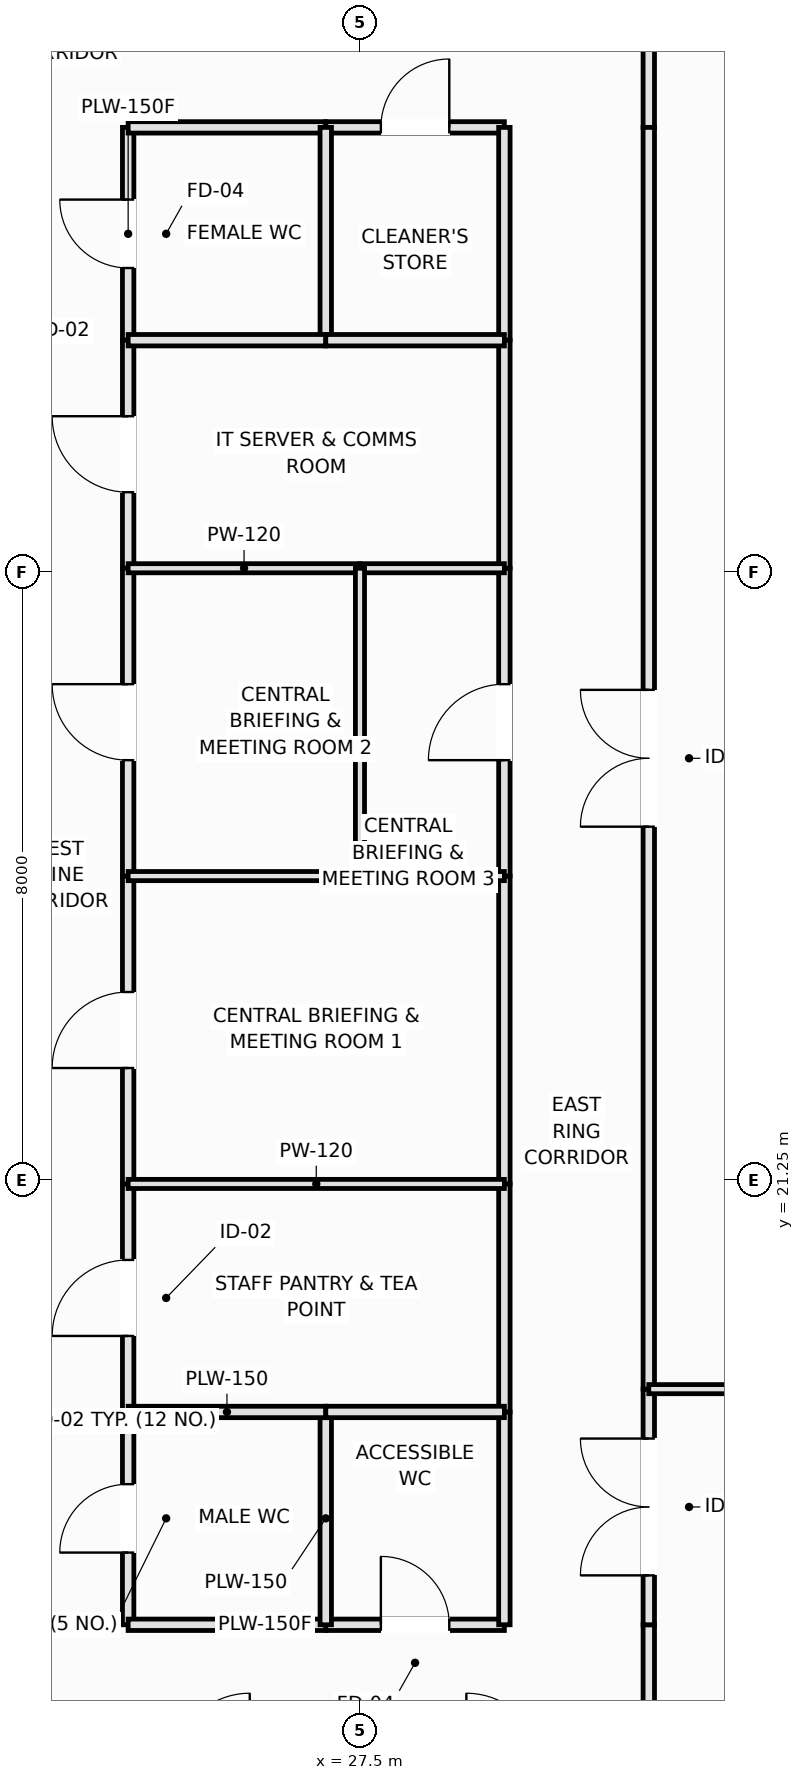
"""IFC4 building model, lengths in metres.
Left out: names, types, materials, properties, quantities, classifications, styles, units other than length and angle.
Written with IfcOpenShell. Run it as: python <this file> out.ifc"""

import sys

from ifc_helpers import new_model, si_unit, direction, frame, frame_2d, origin, place, context, subcontext, project, spatial, rectangle, extrude, element, fill, save


model = new_model("IFC4")
c1 = context("Model", 3, precision=1e-05, world=origin(), true_north=direction((0.0, 1.0)))
c2 = subcontext(c1, "Body", "Model", "MODEL_VIEW")
j1 = project(units=[si_unit("LENGTHUNIT", "METRE"), si_unit("PLANEANGLEUNIT", "RADIAN")], contexts=[c1])
p1 = place(None, origin())
s1 = spatial("IfcSite", under=j1, at=p1, CompositionType="ELEMENT")
p2 = place(p1, origin())
s2 = spatial("IfcBuilding", under=s1, at=p2, CompositionType="ELEMENT")
p3 = place(p2, frame((0.0, 0.0, 85.95)))
s3 = spatial("IfcBuildingStorey", under=s2, at=p3, CompositionType="ELEMENT", Elevation=85.95)
p4 = place(p3, frame((24.45, 15.4, 0.0), z_axis=(0.0, 0.0, 1.0), x_axis=(0.0, 1.0, 0.0)))
e1 = element("IfcWall", 1, at=p4, inside=s3, PredefinedType="PLUMBINGWALL", context=c2, shape_type="SweptSolid", body=[
    extrude(rectangle(XDim=2.8, YDim=0.15, at=frame_2d((1.4, 0.0))), origin(), (0.0, 0.0, 1.0), 3.37),
])
p5 = place(p4, frame((0.95, 0.0, 0.0)))
e2 = element("IfcOpeningElement", 2, at=p5, cuts=e1, PredefinedType="OPENING", context=c2, shape_type="SweptSolid", body=[
    extrude(rectangle(XDim=0.9, YDim=2.1, at=frame_2d((0.45, 1.05))), frame((0.0, 0.085, 0.0), z_axis=(0.0, -1.0, 0.0), x_axis=(1.0, 0.0, 0.0)), (0.0, 0.0, 1.0), 0.17),
])
p6 = place(p3, frame((24.45, 32.3, 0.0), z_axis=(0.0, 0.0, 1.0), x_axis=(0.0, 1.0, 0.0)))
e3 = element("IfcWall", 3, at=p6, inside=s3, PredefinedType="PLUMBINGWALL", context=c2, shape_type="SweptSolid", body=[
    extrude(rectangle(XDim=2.8, YDim=0.15, at=frame_2d((1.4, 0.0))), origin(), (0.0, 0.0, 1.0), 3.37),
])
p7 = place(p6, frame((0.95, 0.0, 0.0)))
e4 = element("IfcOpeningElement", 4, at=p7, cuts=e3, PredefinedType="OPENING", context=c2, shape_type="SweptSolid", body=[
    extrude(rectangle(XDim=0.9, YDim=2.1, at=frame_2d((0.45, 1.05))), frame((0.0, 0.085, 0.0), z_axis=(0.0, -1.0, 0.0), x_axis=(1.0, 0.0, 0.0)), (0.0, 0.0, 1.0), 0.17),
])
p8 = place(p3, frame((24.45, 18.2, 0.0), z_axis=(0.0, 0.0, 1.0), x_axis=(0.0, 1.0, 0.0)))
e5 = element("IfcWall", 5, at=p8, inside=s3, PredefinedType="PARTITIONING", context=c2, shape_type="SweptSolid", body=[
    extrude(rectangle(XDim=3.0, YDim=0.15, at=frame_2d((1.5, 0.0))), origin(), (0.0, 0.0, 1.0), 3.37),
])
p9 = place(p8, frame((1.0, 0.0, 0.0)))
e6 = element("IfcOpeningElement", 6, at=p9, cuts=e5, PredefinedType="OPENING", context=c2, shape_type="SweptSolid", body=[
    extrude(rectangle(XDim=1.0, YDim=2.15, at=frame_2d((0.5, 1.075))), frame((0.0, 0.085, 0.0), z_axis=(0.0, -1.0, 0.0), x_axis=(1.0, 0.0, 0.0)), (0.0, 0.0, 1.0), 0.17),
])
p10 = place(p3, frame((24.45, 29.3, 0.0), z_axis=(0.0, 0.0, 1.0), x_axis=(0.0, 1.0, 0.0)))
e7 = element("IfcWall", 7, at=p10, inside=s3, PredefinedType="PARTITIONING", context=c2, shape_type="SweptSolid", body=[
    extrude(rectangle(XDim=3.0, YDim=0.15, at=frame_2d((1.5, 0.0))), origin(), (0.0, 0.0, 1.0), 3.37),
])
p11 = place(p10, frame((1.0, 0.0, 0.0)))
e8 = element("IfcOpeningElement", 8, at=p11, cuts=e7, PredefinedType="OPENING", context=c2, shape_type="SweptSolid", body=[
    extrude(rectangle(XDim=1.0, YDim=2.15, at=frame_2d((0.5, 1.075))), frame((0.0, 0.085, 0.0), z_axis=(0.0, -1.0, 0.0), x_axis=(1.0, 0.0, 0.0)), (0.0, 0.0, 1.0), 0.17),
])
p12 = place(p3, frame((24.45, 21.2, 0.0), z_axis=(0.0, 0.0, 1.0), x_axis=(0.0, 1.0, 0.0)))
e9 = element("IfcWall", 9, at=p12, inside=s3, PredefinedType="PARTITIONING", context=c2, shape_type="SweptSolid", body=[
    extrude(rectangle(XDim=4.05, YDim=0.15, at=frame_2d((2.025, 0.0))), origin(), (0.0, 0.0, 1.0), 3.37),
])
p13 = place(p12, frame((1.525, 0.0, 0.0)))
e10 = element("IfcOpeningElement", 10, at=p13, cuts=e9, PredefinedType="OPENING", context=c2, shape_type="SweptSolid", body=[
    extrude(rectangle(XDim=1.0, YDim=2.15, at=frame_2d((0.5, 1.075))), frame((0.0, 0.085, 0.0), z_axis=(0.0, -1.0, 0.0), x_axis=(1.0, 0.0, 0.0)), (0.0, 0.0, 1.0), 0.17),
])
p14 = place(p3, frame((24.45, 25.25, 0.0), z_axis=(0.0, 0.0, 1.0), x_axis=(0.0, 1.0, 0.0)))
e11 = element("IfcWall", 11, at=p14, inside=s3, PredefinedType="PARTITIONING", context=c2, shape_type="SweptSolid", body=[
    extrude(rectangle(XDim=4.05, YDim=0.15, at=frame_2d((2.025, 0.0))), origin(), (0.0, 0.0, 1.0), 3.37),
])
p15 = place(p14, frame((1.525, 0.0, 0.0)))
e12 = element("IfcOpeningElement", 12, at=p15, cuts=e11, PredefinedType="OPENING", context=c2, shape_type="SweptSolid", body=[
    extrude(rectangle(XDim=1.0, YDim=2.15, at=frame_2d((0.5, 1.075))), frame((0.0, 0.085, 0.0), z_axis=(0.0, -1.0, 0.0), x_axis=(1.0, 0.0, 0.0)), (0.0, 0.0, 1.0), 0.17),
])
p16 = place(p3, frame((24.45, 15.4, 0.0), z_axis=(0.0, 0.0, 1.0), x_axis=(1.0, 0.0, 0.0)))
e13 = element("IfcWall", 13, at=p16, inside=s3, PredefinedType="PLUMBINGWALL", context=c2, shape_type="SweptSolid", body=[
    extrude(rectangle(XDim=2.6, YDim=0.15, at=frame_2d((1.3, 0.0))), origin(), (0.0, 0.0, 1.0), 3.37),
])
p17 = place(p3, frame((27.05, 15.4, 0.0), z_axis=(0.0, 0.0, 1.0), x_axis=(1.0, 0.0, 0.0)))
e14 = element("IfcWall", 14, at=p17, inside=s3, PredefinedType="PLUMBINGWALL", context=c2, shape_type="SweptSolid", body=[
    extrude(rectangle(XDim=2.35, YDim=0.15, at=frame_2d((1.175, 0.0))), origin(), (0.0, 0.0, 1.0), 3.37),
])
p18 = place(p17, frame((0.725, 0.0, 0.0)))
e15 = element("IfcOpeningElement", 15, at=p18, cuts=e14, PredefinedType="OPENING", context=c2, shape_type="SweptSolid", body=[
    extrude(rectangle(XDim=0.9, YDim=2.1, at=frame_2d((0.45, 1.05))), frame((0.0, 0.085, 0.0), z_axis=(0.0, -1.0, 0.0), x_axis=(1.0, 0.0, 0.0)), (0.0, 0.0, 1.0), 0.17),
])
p19 = place(p3, frame((31.3, 13.5, 0.0), z_axis=(0.0, 0.0, 1.0), x_axis=(0.0, 1.0, 0.0)))
e16 = element("IfcWall", 16, at=p19, inside=s3, PredefinedType="PARTITIONING", context=c2, shape_type="SweptSolid", body=[
    extrude(rectangle(XDim=1.9, YDim=0.15, at=frame_2d((0.95, 0.0))), origin(), (0.0, 0.0, 1.0), 3.37),
])
p20 = place(p3, frame((24.45, 35.1, 0.0), z_axis=(0.0, 0.0, 1.0), x_axis=(1.0, 0.0, 0.0)))
e17 = element("IfcWall", 17, at=p20, inside=s3, PredefinedType="PLUMBINGWALL", context=c2, shape_type="SweptSolid", body=[
    extrude(rectangle(XDim=2.6, YDim=0.15, at=frame_2d((1.3, 0.0))), origin(), (0.0, 0.0, 1.0), 3.37),
])
p21 = place(p3, frame((27.05, 35.1, 0.0), z_axis=(0.0, 0.0, 1.0), x_axis=(1.0, 0.0, 0.0)))
e18 = element("IfcWall", 18, at=p21, inside=s3, PredefinedType="PLUMBINGWALL", context=c2, shape_type="SweptSolid", body=[
    extrude(rectangle(XDim=2.35, YDim=0.15, at=frame_2d((1.175, 0.0))), origin(), (0.0, 0.0, 1.0), 3.37),
])
p22 = place(p21, frame((0.725, 0.0, 0.0)))
e19 = element("IfcOpeningElement", 19, at=p22, cuts=e18, PredefinedType="OPENING", context=c2, shape_type="SweptSolid", body=[
    extrude(rectangle(XDim=0.9, YDim=2.1, at=frame_2d((0.45, 1.05))), frame((0.0, 0.085, 0.0), z_axis=(0.0, -1.0, 0.0), x_axis=(1.0, 0.0, 0.0)), (0.0, 0.0, 1.0), 0.17),
])
p23 = place(p3, frame((31.3, 35.1, 0.0), z_axis=(0.0, 0.0, 1.0), x_axis=(0.0, 1.0, 0.0)))
e20 = element("IfcWall", 20, at=p23, inside=s3, PredefinedType="PARTITIONING", context=c2, shape_type="SweptSolid", body=[
    extrude(rectangle(XDim=1.9, YDim=0.15, at=frame_2d((0.95, 0.0))), origin(), (0.0, 0.0, 1.0), 3.37),
])
for number, where, z_axis, x_axis in (
    (21, (29.4, 15.4, 0.0), (0.0, 0.0, 1.0), (0.0, 1.0, 0.0)),
    (22, (29.4, 32.3, 0.0), (0.0, 0.0, 1.0), (0.0, 1.0, 0.0)),
):
    element("IfcWall", number, at=place(p3, frame(where, z_axis=z_axis, x_axis=x_axis)), inside=s3, PredefinedType="PLUMBINGWALL", context=c2, shape_type="SweptSolid", body=[
        extrude(rectangle(XDim=2.8, YDim=0.15, at=frame_2d((1.4, 0.0))), origin(), (0.0, 0.0, 1.0), 3.37),
    ])
for number, where, z_axis, x_axis in (
    (23, (29.4, 18.2, 0.0), (0.0, 0.0, 1.0), (0.0, 1.0, 0.0)),
    (24, (29.4, 29.3, 0.0), (0.0, 0.0, 1.0), (0.0, 1.0, 0.0)),
):
    element("IfcWall", number, at=place(p3, frame(where, z_axis=z_axis, x_axis=x_axis)), inside=s3, PredefinedType="PARTITIONING", context=c2, shape_type="SweptSolid", body=[
        extrude(rectangle(XDim=3.0, YDim=0.15, at=frame_2d((1.5, 0.0))), origin(), (0.0, 0.0, 1.0), 3.37),
    ])
p24 = place(p3, frame((29.4, 21.2, 0.0), z_axis=(0.0, 0.0, 1.0), x_axis=(0.0, 1.0, 0.0)))
e25 = element("IfcWall", 25, at=p24, inside=s3, PredefinedType="PARTITIONING", context=c2, shape_type="SweptSolid", body=[
    extrude(rectangle(XDim=4.05, YDim=0.15, at=frame_2d((2.025, 0.0))), origin(), (0.0, 0.0, 1.0), 3.37),
])
p25 = place(p3, frame((29.4, 25.25, 0.0), z_axis=(0.0, 0.0, 1.0), x_axis=(0.0, 1.0, 0.0)))
e26 = element("IfcWall", 26, at=p25, inside=s3, PredefinedType="PARTITIONING", context=c2, shape_type="SweptSolid", body=[
    extrude(rectangle(XDim=4.05, YDim=0.15, at=frame_2d((2.025, 0.0))), origin(), (0.0, 0.0, 1.0), 3.37),
])
p26 = place(p25, frame((1.525, 0.0, 0.0)))
e27 = element("IfcOpeningElement", 27, at=p26, cuts=e26, PredefinedType="OPENING", context=c2, shape_type="SweptSolid", body=[
    extrude(rectangle(XDim=1.0, YDim=2.15, at=frame_2d((0.5, 1.075))), frame((0.0, 0.085, 0.0), z_axis=(0.0, -1.0, 0.0), x_axis=(1.0, 0.0, 0.0)), (0.0, 0.0, 1.0), 0.17),
])
p27 = place(p3, frame((31.3, 15.4, 0.0), z_axis=(0.0, 0.0, 1.0), x_axis=(0.0, 1.0, 0.0)))
e28 = element("IfcWall", 28, at=p27, inside=s3, PredefinedType="PARTITIONING", context=c2, shape_type="SweptSolid", body=[
    extrude(rectangle(XDim=3.1, YDim=0.15, at=frame_2d((1.55, 0.0))), origin(), (0.0, 0.0, 1.0), 3.37),
])
p28 = place(p27, frame((0.65, 0.0, 0.0)))
e29 = element("IfcOpeningElement", 29, at=p28, cuts=e28, PredefinedType="OPENING", context=c2, shape_type="SweptSolid", body=[
    extrude(rectangle(XDim=1.8, YDim=2.2, at=frame_2d((0.9, 1.1))), frame((0.0, 0.085, 0.0), z_axis=(0.0, -1.0, 0.0), x_axis=(1.0, 0.0, 0.0)), (0.0, 0.0, 1.0), 0.17),
])
p29 = place(p3, frame((31.3, 18.5, 0.0), z_axis=(0.0, 0.0, 1.0), x_axis=(0.0, 1.0, 0.0)))
e30 = element("IfcWall", 30, at=p29, inside=s3, PredefinedType="PARTITIONING", context=c2, shape_type="SweptSolid", body=[
    extrude(rectangle(XDim=16.6, YDim=0.15, at=frame_2d((8.3, 0.0))), origin(), (0.0, 0.0, 1.0), 3.37),
])
p30 = place(p29, frame((7.4, 0.0, 0.0)))
e31 = element("IfcOpeningElement", 31, at=p30, cuts=e30, PredefinedType="OPENING", context=c2, shape_type="SweptSolid", body=[
    extrude(rectangle(XDim=1.8, YDim=2.2, at=frame_2d((0.9, 1.1))), frame((0.0, 0.085, 0.0), z_axis=(0.0, -1.0, 0.0), x_axis=(1.0, 0.0, 0.0)), (0.0, 0.0, 1.0), 0.17),
])
p31 = place(p3, frame((27.05, 15.4, 0.0), z_axis=(0.0, 0.0, 1.0), x_axis=(0.0, 1.0, 0.0)))
e32 = element("IfcWall", 32, at=p31, inside=s3, PredefinedType="PLUMBINGWALL", context=c2, shape_type="SweptSolid", body=[
    extrude(rectangle(XDim=2.8, YDim=0.15, at=frame_2d((1.4, 0.0))), origin(), (0.0, 0.0, 1.0), 3.37),
])
p32 = place(p3, frame((24.45, 18.2, 0.0), z_axis=(0.0, 0.0, 1.0), x_axis=(1.0, 0.0, 0.0)))
e33 = element("IfcWall", 33, at=p32, inside=s3, PredefinedType="PLUMBINGWALL", context=c2, shape_type="SweptSolid", body=[
    extrude(rectangle(XDim=2.6, YDim=0.15, at=frame_2d((1.3, 0.0))), origin(), (0.0, 0.0, 1.0), 3.37),
])
p33 = place(p3, frame((27.05, 18.2, 0.0), z_axis=(0.0, 0.0, 1.0), x_axis=(1.0, 0.0, 0.0)))
e34 = element("IfcWall", 34, at=p33, inside=s3, PredefinedType="PLUMBINGWALL", context=c2, shape_type="SweptSolid", body=[
    extrude(rectangle(XDim=2.35, YDim=0.15, at=frame_2d((1.175, 0.0))), origin(), (0.0, 0.0, 1.0), 3.37),
])
p34 = place(p3, frame((27.05, 32.3, 0.0), z_axis=(0.0, 0.0, 1.0), x_axis=(0.0, 1.0, 0.0)))
e35 = element("IfcWall", 35, at=p34, inside=s3, PredefinedType="PLUMBINGWALL", context=c2, shape_type="SweptSolid", body=[
    extrude(rectangle(XDim=2.8, YDim=0.15, at=frame_2d((1.4, 0.0))), origin(), (0.0, 0.0, 1.0), 3.37),
])
p35 = place(p3, frame((24.45, 32.3, 0.0), z_axis=(0.0, 0.0, 1.0), x_axis=(1.0, 0.0, 0.0)))
e36 = element("IfcWall", 36, at=p35, inside=s3, PredefinedType="PLUMBINGWALL", context=c2, shape_type="SweptSolid", body=[
    extrude(rectangle(XDim=2.6, YDim=0.15, at=frame_2d((1.3, 0.0))), origin(), (0.0, 0.0, 1.0), 3.37),
])
p36 = place(p3, frame((27.05, 32.3, 0.0), z_axis=(0.0, 0.0, 1.0), x_axis=(1.0, 0.0, 0.0)))
e37 = element("IfcWall", 37, at=p36, inside=s3, PredefinedType="PLUMBINGWALL", context=c2, shape_type="SweptSolid", body=[
    extrude(rectangle(XDim=2.35, YDim=0.15, at=frame_2d((1.175, 0.0))), origin(), (0.0, 0.0, 1.0), 3.37),
])
p37 = place(p3, frame((24.45, 21.2, 0.0), z_axis=(0.0, 0.0, 1.0), x_axis=(1.0, 0.0, 0.0)))
e38 = element("IfcWall", 38, at=p37, inside=s3, PredefinedType="PARTITIONING", context=c2, shape_type="SweptSolid", body=[
    extrude(rectangle(XDim=4.95, YDim=0.12, at=frame_2d((2.475, 0.0))), origin(), (0.0, 0.0, 1.0), 3.37),
])
p38 = place(p3, frame((24.45, 29.3, 0.0), z_axis=(0.0, 0.0, 1.0), x_axis=(1.0, 0.0, 0.0)))
e39 = element("IfcWall", 39, at=p38, inside=s3, PredefinedType="PARTITIONING", context=c2, shape_type="SweptSolid", body=[
    extrude(rectangle(XDim=3.05, YDim=0.12, at=frame_2d((1.525, 0.0))), origin(), (0.0, 0.0, 1.0), 3.37),
])
p39 = place(p3, frame((27.5, 29.3, 0.0), z_axis=(0.0, 0.0, 1.0), x_axis=(1.0, 0.0, 0.0)))
e40 = element("IfcWall", 40, at=p39, inside=s3, PredefinedType="PARTITIONING", context=c2, shape_type="SweptSolid", body=[
    extrude(rectangle(XDim=1.9, YDim=0.12, at=frame_2d((0.95, 0.0))), origin(), (0.0, 0.0, 1.0), 3.37),
])
p40 = place(p3, frame((24.45, 25.25, 0.0), z_axis=(0.0, 0.0, 1.0), x_axis=(1.0, 0.0, 0.0)))
e41 = element("IfcWall", 41, at=p40, inside=s3, PredefinedType="PARTITIONING", context=c2, shape_type="SweptSolid", body=[
    extrude(rectangle(XDim=3.05, YDim=0.12, at=frame_2d((1.525, 0.0))), origin(), (0.0, 0.0, 1.0), 2.72),
])
p41 = place(p3, frame((27.5, 25.25, 0.0), z_axis=(0.0, 0.0, 1.0), x_axis=(1.0, 0.0, 0.0)))
e42 = element("IfcWall", 42, at=p41, inside=s3, PredefinedType="PARTITIONING", context=c2, shape_type="SweptSolid", body=[
    extrude(rectangle(XDim=1.9, YDim=0.12, at=frame_2d((0.95, 0.0))), origin(), (0.0, 0.0, 1.0), 2.72),
])
p42 = place(p3, frame((27.5, 25.25, 0.0), z_axis=(0.0, 0.0, 1.0), x_axis=(0.0, 1.0, 0.0)))
e43 = element("IfcWall", 43, at=p42, inside=s3, PredefinedType="PARTITIONING", context=c2, shape_type="SweptSolid", body=[
    extrude(rectangle(XDim=4.05, YDim=0.12, at=frame_2d((2.025, 0.0))), origin(), (0.0, 0.0, 1.0), 3.37),
])
p43 = place(p3, frame((31.3, 18.5, 0.0), z_axis=(0.0, 0.0, 1.0), x_axis=(1.0, 0.0, 0.0)))
e44 = element("IfcWall", 44, at=p43, inside=s3, PredefinedType="PARTITIONING", context=c2, shape_type="SweptSolid", body=[
    extrude(rectangle(XDim=22.19, YDim=0.12, at=frame_2d((11.095, 0.0))), origin(), (0.0, 0.0, 1.0), 2.72),
])
p44 = place(p5, origin())
e45 = element("IfcDoor", 45, at=p44, inside=s3, OperationType="SINGLE_SWING_LEFT", PredefinedType="DOOR", context=c2, shape_type="SweptSolid", body=[
    extrude(rectangle(XDim=0.9, YDim=2.1, at=frame_2d((0.45, 1.05))), frame((0.0, 0.025, 0.0), z_axis=(0.0, -1.0, 0.0), x_axis=(1.0, 0.0, 0.0)), (0.0, 0.0, 1.0), 0.05),
])
fill(e2, e45)
p45 = place(p7, origin())
e46 = element("IfcDoor", 46, at=p45, inside=s3, OperationType="SINGLE_SWING_RIGHT", PredefinedType="DOOR", context=c2, shape_type="SweptSolid", body=[
    extrude(rectangle(XDim=0.9, YDim=2.1, at=frame_2d((0.45, 1.05))), frame((0.0, 0.025, 0.0), z_axis=(0.0, -1.0, 0.0), x_axis=(1.0, 0.0, 0.0)), (0.0, 0.0, 1.0), 0.05),
])
fill(e4, e46)
p46 = place(p9, origin())
e47 = element("IfcDoor", 47, at=p46, inside=s3, OperationType="SINGLE_SWING_LEFT", PredefinedType="DOOR", context=c2, shape_type="SweptSolid", body=[
    extrude(rectangle(XDim=1.0, YDim=2.15, at=frame_2d((0.5, 1.075))), frame((0.0, 0.025, 0.0), z_axis=(0.0, -1.0, 0.0), x_axis=(1.0, 0.0, 0.0)), (0.0, 0.0, 1.0), 0.05),
])
fill(e6, e47)
p47 = place(p11, origin())
e48 = element("IfcDoor", 48, at=p47, inside=s3, OperationType="SINGLE_SWING_RIGHT", PredefinedType="DOOR", context=c2, shape_type="SweptSolid", body=[
    extrude(rectangle(XDim=1.0, YDim=2.15, at=frame_2d((0.5, 1.075))), frame((0.0, 0.025, 0.0), z_axis=(0.0, -1.0, 0.0), x_axis=(1.0, 0.0, 0.0)), (0.0, 0.0, 1.0), 0.05),
])
fill(e8, e48)
p48 = place(p13, origin())
e49 = element("IfcDoor", 49, at=p48, inside=s3, OperationType="SINGLE_SWING_LEFT", PredefinedType="DOOR", context=c2, shape_type="SweptSolid", body=[
    extrude(rectangle(XDim=1.0, YDim=2.15, at=frame_2d((0.5, 1.075))), frame((0.0, 0.025, 0.0), z_axis=(0.0, -1.0, 0.0), x_axis=(1.0, 0.0, 0.0)), (0.0, 0.0, 1.0), 0.05),
])
fill(e10, e49)
p49 = place(p15, origin())
e50 = element("IfcDoor", 50, at=p49, inside=s3, OperationType="SINGLE_SWING_RIGHT", PredefinedType="DOOR", context=c2, shape_type="SweptSolid", body=[
    extrude(rectangle(XDim=1.0, YDim=2.15, at=frame_2d((0.5, 1.075))), frame((0.0, 0.025, 0.0), z_axis=(0.0, -1.0, 0.0), x_axis=(1.0, 0.0, 0.0)), (0.0, 0.0, 1.0), 0.05),
])
fill(e12, e50)
p50 = place(p18, origin())
e51 = element("IfcDoor", 51, at=p50, inside=s3, OperationType="SINGLE_SWING_LEFT", PredefinedType="DOOR", context=c2, shape_type="SweptSolid", body=[
    extrude(rectangle(XDim=0.9, YDim=2.1, at=frame_2d((0.45, 1.05))), frame((0.0, 0.025, 0.0), z_axis=(0.0, -1.0, 0.0), x_axis=(1.0, 0.0, 0.0)), (0.0, 0.0, 1.0), 0.05),
])
fill(e15, e51)
p51 = place(p22, origin())
e52 = element("IfcDoor", 52, at=p51, inside=s3, OperationType="SINGLE_SWING_RIGHT", PredefinedType="DOOR", context=c2, shape_type="SweptSolid", body=[
    extrude(rectangle(XDim=0.9, YDim=2.1, at=frame_2d((0.45, 1.05))), frame((0.0, 0.025, 0.0), z_axis=(0.0, -1.0, 0.0), x_axis=(1.0, 0.0, 0.0)), (0.0, 0.0, 1.0), 0.05),
])
fill(e19, e52)
p52 = place(p26, origin())
e53 = element("IfcDoor", 53, at=p52, inside=s3, OperationType="SINGLE_SWING_LEFT", PredefinedType="DOOR", context=c2, shape_type="SweptSolid", body=[
    extrude(rectangle(XDim=1.0, YDim=2.15, at=frame_2d((0.5, 1.075))), frame((0.0, 0.025, 0.0), z_axis=(0.0, -1.0, 0.0), x_axis=(1.0, 0.0, 0.0)), (0.0, 0.0, 1.0), 0.05),
])
fill(e27, e53)
p53 = place(p28, origin())
e54 = element("IfcDoor", 54, at=p53, inside=s3, OperationType="DOUBLE_DOOR_SINGLE_SWING", PredefinedType="DOOR", context=c2, shape_type="SweptSolid", body=[
    extrude(rectangle(XDim=1.8, YDim=2.2, at=frame_2d((0.9, 1.1))), frame((0.0, 0.025, 0.0), z_axis=(0.0, -1.0, 0.0), x_axis=(1.0, 0.0, 0.0)), (0.0, 0.0, 1.0), 0.05),
])
fill(e29, e54)
p54 = place(p30, origin())
e55 = element("IfcDoor", 55, at=p54, inside=s3, OperationType="DOUBLE_DOOR_SINGLE_SWING", PredefinedType="DOOR", context=c2, shape_type="SweptSolid", body=[
    extrude(rectangle(XDim=1.8, YDim=2.2, at=frame_2d((0.9, 1.1))), frame((0.0, 0.025, 0.0), z_axis=(0.0, -1.0, 0.0), x_axis=(1.0, 0.0, 0.0)), (0.0, 0.0, 1.0), 0.05),
])
fill(e31, e55)
save(model, sys.argv[1])
